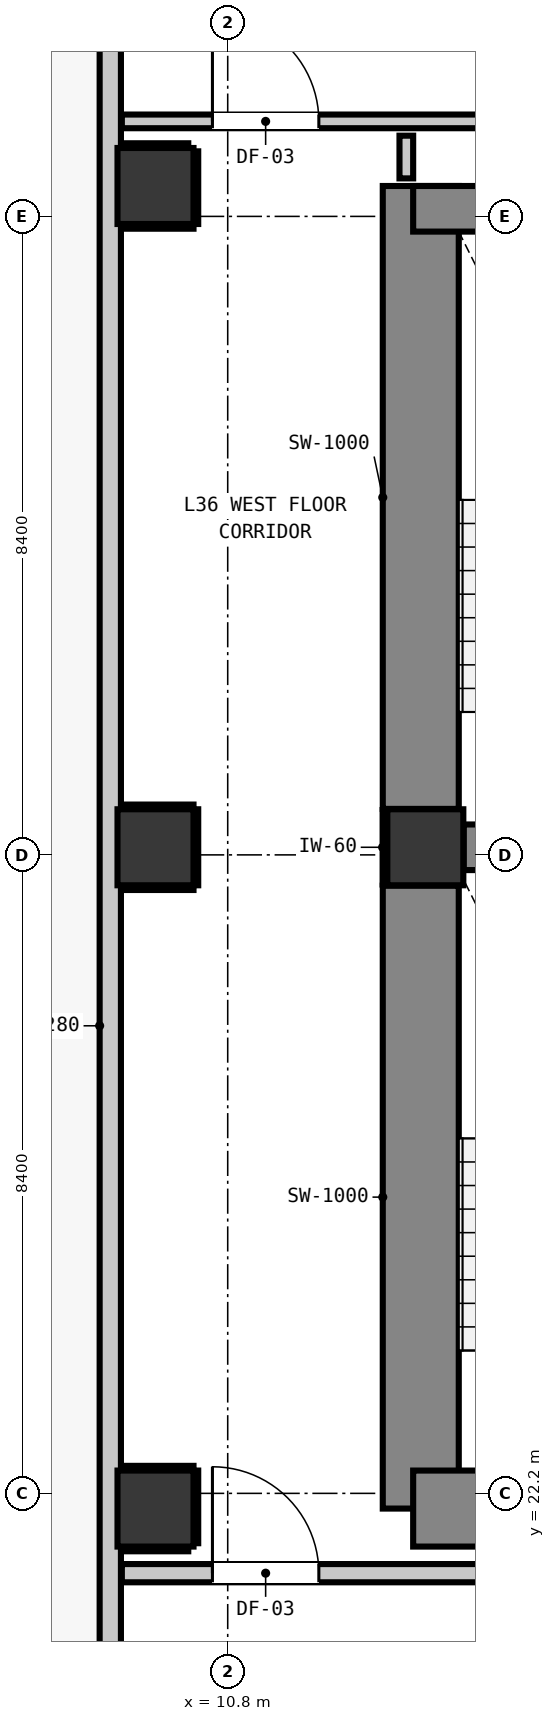
"""IFC4 building model, lengths in metres.
Left out: names, types, materials, properties, quantities, classifications, styles, units other than length and angle.
Written with IfcOpenShell. Run it as: python <this file> out.ifc"""

import sys

from ifc_helpers import new_model, si_unit, direction, frame, frame_2d, origin, origin_2d, place, context, subcontext, project, spatial, rectangle, extrude, element, fill, save


model = new_model("IFC4")
c1 = context("Model", 3, precision=1e-05, world=origin(), true_north=direction((0.0, 1.0)))
c2 = subcontext(c1, "Body", "Model", "MODEL_VIEW")
j1 = project(units=[si_unit("LENGTHUNIT", "METRE"), si_unit("PLANEANGLEUNIT", "RADIAN")], contexts=[c1])
p1 = place(None, origin())
s1 = spatial("IfcSite", under=j1, at=p1, CompositionType="ELEMENT")
p2 = place(p1, origin())
s2 = spatial("IfcBuilding", under=s1, at=p2, CompositionType="ELEMENT")
p3 = place(p2, frame((0.0, 0.0, 126.0)))
s3 = spatial("IfcBuildingStorey", under=s2, at=p3, CompositionType="ELEMENT", Elevation=126.0)
p4 = place(p3, frame((13.4, 30.7, 0.0), z_axis=(0.0, 0.0, 1.0), x_axis=(1.0, 0.0, 0.0)))
e1 = element("IfcColumn", 1, at=p4, inside=s3, PredefinedType="COLUMN", context=c2, shape_type="SweptSolid", body=[
    extrude(rectangle(XDim=1.0, YDim=1.0, at=origin_2d()), origin(), (0.0, 0.0, 1.0), 3.32),
])
p5 = place(p3, frame((13.34, 22.0, 0.0), z_axis=(0.0, 0.0, 1.0), x_axis=(0.0, 1.0, 0.0)))
e2 = element("IfcWall", 2, at=p5, inside=s3, PredefinedType="SHEAR", context=c2, shape_type="SweptSolid", body=[
    extrude(rectangle(XDim=8.195, YDim=1.0, at=frame_2d((4.098, 0.0))), origin(), (0.0, 0.0, 1.0), 3.32),
])
p6 = place(p3, frame((13.34, 31.205, 0.0), z_axis=(0.0, 0.0, 1.0), x_axis=(0.0, 1.0, 0.0)))
e3 = element("IfcWall", 3, at=p6, inside=s3, PredefinedType="SHEAR", context=c2, shape_type="SweptSolid", body=[
    extrude(rectangle(XDim=8.195, YDim=1.0, at=frame_2d((4.097, 0.0))), origin(), (0.0, 0.0, 1.0), 3.32),
])
p7 = place(p3, frame((13.24, 22.0, 0.0), z_axis=(0.0, 0.0, 1.0), x_axis=(1.0, 0.0, 0.0)))
e4 = element("IfcWall", 4, at=p7, inside=s3, PredefinedType="SHEAR", context=c2, shape_type="SweptSolid", body=[
    extrude(rectangle(XDim=4.08, YDim=1.0, at=frame_2d((2.04, 0.0))), origin(), (0.0, 0.0, 1.0), 3.32),
])
p8 = place(p3, frame((13.24, 39.1, 0.0), z_axis=(0.0, 0.0, 1.0), x_axis=(1.0, 0.0, 0.0)))
e5 = element("IfcWall", 5, at=p8, inside=s3, PredefinedType="SHEAR", context=c2, shape_type="SweptSolid", body=[
    extrude(rectangle(XDim=4.08, YDim=0.6, at=frame_2d((2.04, 0.0))), origin(), (0.0, 0.0, 1.0), 3.32),
])
p9 = place(p3, frame((13.905, 30.7, 0.0), z_axis=(0.0, 0.0, 1.0), x_axis=(1.0, 0.0, 0.0)))
e6 = element("IfcWall", 6, at=p9, inside=s3, PredefinedType="SHEAR", context=c2, shape_type="SweptSolid", body=[
    extrude(rectangle(XDim=3.415, YDim=0.6, at=frame_2d((1.708, 0.0))), origin(), (0.0, 0.0, 1.0), 3.32),
])
for number, where, z_axis, x_axis in (
    (7, (9.85, 22.0, -0.2), (0.0, 0.0, 1.0), (1.0, 0.0, 0.0)),
    (8, (9.85, 30.7, -0.2), (0.0, 0.0, 1.0), (1.0, 0.0, 0.0)),
    (9, (9.85, 39.4, -0.2), (0.0, 0.0, 1.0), (1.0, 0.0, 0.0)),
):
    element("IfcColumn", number, at=place(p3, frame(where, z_axis=z_axis, x_axis=x_axis)), inside=s3, PredefinedType="COLUMN", context=c2, shape_type="SweptSolid", body=[
        extrude(rectangle(XDim=1.0, YDim=1.0, at=origin_2d()), origin(), (0.0, 0.0, 1.0), 3.52),
    ])
p10 = place(p3, frame((9.255, 11.355, 0.0), z_axis=(0.0, 0.0, 1.0), x_axis=(0.0, 1.0, 0.0)))
e10 = element("IfcWall", 10, at=p10, inside=s3, PredefinedType="STANDARD", context=c2, shape_type="SweptSolid", body=[
    extrude(rectangle(XDim=32.29, YDim=0.28, at=frame_2d((16.145, 0.0))), origin(), (0.0, 0.0, 1.0), 3.08),
])
p11 = place(p10, frame((0.503, 0.0, 0.0)))
e11 = element("IfcOpeningElement", 11, at=p11, cuts=e10, PredefinedType="OPENING", context=c2, shape_type="SweptSolid", body=[
    extrude(rectangle(XDim=1.1, YDim=2.15, at=frame_2d((0.55, 1.075))), frame((0.0, 0.15, 0.0), z_axis=(0.0, -1.0, 0.0), x_axis=(1.0, 0.0, 0.0)), (0.0, 0.0, 1.0), 0.3),
])
p12 = place(p3, frame((9.407, 21.15, 0.0), z_axis=(0.0, 0.0, 1.0), x_axis=(1.0, 0.0, 0.0)))
e12 = element("IfcWall", 12, at=p12, inside=s3, PredefinedType="PARTITIONING", context=c2, shape_type="SweptSolid", body=[
    extrude(rectangle(XDim=39.386, YDim=0.24, at=frame_2d((19.693, 0.0))), origin(), (0.0, 0.0, 1.0), 3.08),
])
p13 = place(p12, frame((8.803, 0.0, 0.0)))
e13 = element("IfcOpeningElement", 13, at=p13, cuts=e12, PredefinedType="OPENING", context=c2, shape_type="SweptSolid", body=[
    extrude(rectangle(XDim=1.1, YDim=2.15, at=frame_2d((0.55, 1.075))), frame((0.0, 0.13, 0.0), z_axis=(0.0, -1.0, 0.0), x_axis=(1.0, 0.0, 0.0)), (0.0, 0.0, 1.0), 0.26),
])
p14 = place(p12, frame((1.192, 0.0, 0.0)))
e14 = element("IfcOpeningElement", 14, at=p14, cuts=e12, PredefinedType="OPENING", context=c2, shape_type="SweptSolid", body=[
    extrude(rectangle(XDim=1.4, YDim=2.15, at=frame_2d((0.7, 1.075))), frame((0.0, 0.13, 0.0), z_axis=(0.0, -1.0, 0.0), x_axis=(1.0, 0.0, 0.0)), (0.0, 0.0, 1.0), 0.26),
])
p15 = place(p12, frame((28.643, 0.0, 0.0)))
e15 = element("IfcOpeningElement", 15, at=p15, cuts=e12, PredefinedType="OPENING", context=c2, shape_type="SweptSolid", body=[
    extrude(rectangle(XDim=1.4, YDim=2.15, at=frame_2d((0.7, 1.075))), frame((0.0, 0.13, 0.0), z_axis=(0.0, -1.0, 0.0), x_axis=(1.0, 0.0, 0.0)), (0.0, 0.0, 1.0), 0.26),
])
p16 = place(p3, frame((9.407, 40.25, 0.0), z_axis=(0.0, 0.0, 1.0), x_axis=(1.0, 0.0, 0.0)))
e16 = element("IfcWall", 16, at=p16, inside=s3, PredefinedType="PARTITIONING", context=c2, shape_type="SweptSolid", body=[
    extrude(rectangle(XDim=27.536, YDim=0.18, at=frame_2d((13.768, 0.0))), origin(), (0.0, 0.0, 1.0), 3.08),
])
p17 = place(p16, frame((8.028, 0.0, 0.0)))
e17 = element("IfcOpeningElement", 17, at=p17, cuts=e16, PredefinedType="OPENING", context=c2, shape_type="SweptSolid", body=[
    extrude(rectangle(XDim=1.4, YDim=2.15, at=frame_2d((0.7, 1.075))), frame((0.0, 0.1, 0.0), z_axis=(0.0, -1.0, 0.0), x_axis=(1.0, 0.0, 0.0)), (0.0, 0.0, 1.0), 0.2),
])
p18 = place(p16, frame((1.192, 0.0, 0.0)))
e18 = element("IfcOpeningElement", 18, at=p18, cuts=e16, PredefinedType="OPENING", context=c2, shape_type="SweptSolid", body=[
    extrude(rectangle(XDim=1.4, YDim=2.15, at=frame_2d((0.7, 1.075))), frame((0.0, 0.1, 0.0), z_axis=(0.0, -1.0, 0.0), x_axis=(1.0, 0.0, 0.0)), (0.0, 0.0, 1.0), 0.2),
])
p19 = place(p3, frame((13.15, 39.5, 0.0), z_axis=(0.0, 0.0, 1.0), x_axis=(0.0, 1.0, 0.0)))
e19 = element("IfcWall", 19, at=p19, inside=s3, PredefinedType="PARTITIONING", context=c2, shape_type="SweptSolid", body=[
    extrude(rectangle(XDim=0.562, YDim=0.18, at=frame_2d((0.281, 0.0))), origin(), (0.0, 0.0, 1.0), 2.315),
])
p20 = place(p3, frame((12.868, 30.21, 0.0), z_axis=(0.0, 0.0, 1.0), x_axis=(0.0, 1.0, 0.0)))
e20 = element("IfcWall", 20, at=p20, inside=s3, PredefinedType="PARTITIONING", context=c2, shape_type="SweptSolid", body=[
    extrude(rectangle(XDim=0.98, YDim=0.06, at=frame_2d((0.49, 0.0))), origin(), (0.0, 0.0, 1.0), 1.45),
])
p21 = place(p3, frame((9.41, 21.468, 0.0), z_axis=(0.0, 0.0, 1.0), x_axis=(1.0, 0.0, 0.0)))
e21 = element("IfcWall", 21, at=p21, inside=s3, PredefinedType="PARTITIONING", context=c2, shape_type="SweptSolid", body=[
    extrude(rectangle(XDim=0.871, YDim=0.06, at=frame_2d((0.436, 0.0))), origin(), (0.0, 0.0, 1.0), 1.45),
])
p22 = place(p3, frame((9.41, 22.532, 0.0), z_axis=(0.0, 0.0, 1.0), x_axis=(1.0, 0.0, 0.0)))
e22 = element("IfcWall", 22, at=p22, inside=s3, PredefinedType="PARTITIONING", context=c2, shape_type="SweptSolid", body=[
    extrude(rectangle(XDim=0.94, YDim=0.06, at=frame_2d((0.47, 0.0))), origin(), (0.0, 0.0, 1.0), 1.45),
])
p23 = place(p3, frame((10.382, 21.544, 0.0), z_axis=(0.0, 0.0, 1.0), x_axis=(0.0, 1.0, 0.0)))
e23 = element("IfcWall", 23, at=p23, inside=s3, PredefinedType="PARTITIONING", context=c2, shape_type="SweptSolid", body=[
    extrude(rectangle(XDim=0.956, YDim=0.06, at=frame_2d((0.478, 0.0))), origin(), (0.0, 0.0, 1.0), 1.45),
])
for number, where, z_axis, x_axis in (
    (24, (9.41, 30.168, 0.0), (0.0, 0.0, 1.0), (1.0, 0.0, 0.0)),
    (25, (9.41, 31.232, 0.0), (0.0, 0.0, 1.0), (1.0, 0.0, 0.0)),
):
    element("IfcWall", number, at=place(p3, frame(where, z_axis=z_axis, x_axis=x_axis)), inside=s3, PredefinedType="PARTITIONING", context=c2, shape_type="SweptSolid", body=[
        extrude(rectangle(XDim=0.94, YDim=0.06, at=frame_2d((0.47, 0.0))), origin(), (0.0, 0.0, 1.0), 1.45),
    ])
p24 = place(p3, frame((10.382, 30.2, 0.0), z_axis=(0.0, 0.0, 1.0), x_axis=(0.0, 1.0, 0.0)))
e26 = element("IfcWall", 26, at=p24, inside=s3, PredefinedType="PARTITIONING", context=c2, shape_type="SweptSolid", body=[
    extrude(rectangle(XDim=1.0, YDim=0.06, at=frame_2d((0.5, 0.0))), origin(), (0.0, 0.0, 1.0), 1.45),
])
p25 = place(p3, frame((9.41, 38.868, 0.0), z_axis=(0.0, 0.0, 1.0), x_axis=(1.0, 0.0, 0.0)))
e27 = element("IfcWall", 27, at=p25, inside=s3, PredefinedType="PARTITIONING", context=c2, shape_type="SweptSolid", body=[
    extrude(rectangle(XDim=0.94, YDim=0.06, at=frame_2d((0.47, 0.0))), origin(), (0.0, 0.0, 1.0), 1.45),
])
p26 = place(p3, frame((9.41, 39.932, 0.0), z_axis=(0.0, 0.0, 1.0), x_axis=(1.0, 0.0, 0.0)))
e28 = element("IfcWall", 28, at=p26, inside=s3, PredefinedType="PARTITIONING", context=c2, shape_type="SweptSolid", body=[
    extrude(rectangle(XDim=0.871, YDim=0.06, at=frame_2d((0.436, 0.0))), origin(), (0.0, 0.0, 1.0), 1.45),
])
p27 = place(p3, frame((10.382, 38.9, 0.0), z_axis=(0.0, 0.0, 1.0), x_axis=(0.0, 1.0, 0.0)))
e29 = element("IfcWall", 29, at=p27, inside=s3, PredefinedType="PARTITIONING", context=c2, shape_type="SweptSolid", body=[
    extrude(rectangle(XDim=0.956, YDim=0.06, at=frame_2d((0.478, 0.0))), origin(), (0.0, 0.0, 1.0), 1.45),
])
p28 = place(p14, origin())
e30 = element("IfcDoor", 30, at=p28, inside=s3, OperationType="SINGLE_SWING_LEFT", PredefinedType="DOOR", context=c2, shape_type="SweptSolid", body=[
    extrude(rectangle(XDim=1.4, YDim=2.15, at=frame_2d((0.7, 1.075))), frame((0.0, 0.025, 0.0), z_axis=(0.0, -1.0, 0.0), x_axis=(1.0, 0.0, 0.0)), (0.0, 0.0, 1.0), 0.05),
])
fill(e14, e30)
p29 = place(p18, origin())
e31 = element("IfcDoor", 31, at=p29, inside=s3, OperationType="SINGLE_SWING_LEFT", PredefinedType="DOOR", context=c2, shape_type="SweptSolid", body=[
    extrude(rectangle(XDim=1.4, YDim=2.15, at=frame_2d((0.7, 1.075))), frame((0.0, 0.025, 0.0), z_axis=(0.0, -1.0, 0.0), x_axis=(1.0, 0.0, 0.0)), (0.0, 0.0, 1.0), 0.05),
])
fill(e18, e31)
save(model, sys.argv[1])
